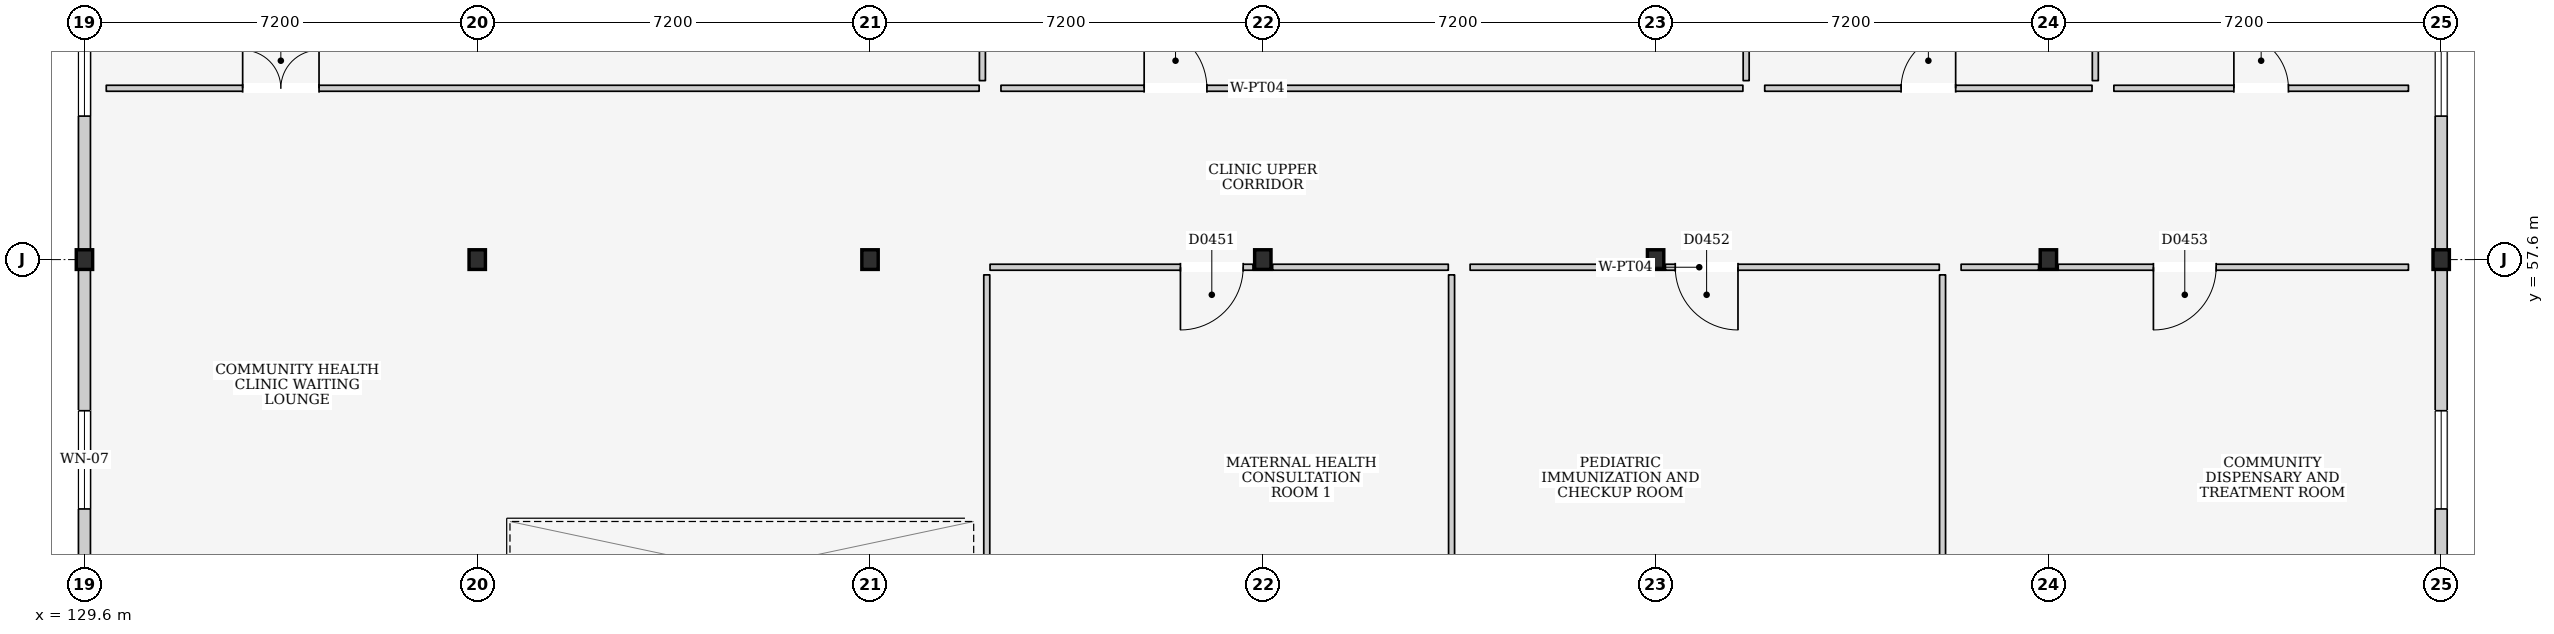
"""IFC4 building model, lengths in metres.
Left out: names, types, materials, properties, quantities, classifications, styles, units other than length and angle.
Written with IfcOpenShell. Run it as: python <this file> out.ifc"""

import sys

from ifc_helpers import new_model, si_unit, direction, frame, frame_2d, origin, origin_2d, place, context, subcontext, project, spatial, rectangle, i_section, extrude, element, fill, save


model = new_model("IFC4")
c1 = context("Model", 3, precision=1e-05, world=origin(), true_north=direction((0.0, 1.0)))
c2 = subcontext(c1, "Body", "Model", "MODEL_VIEW")
j1 = project(units=[si_unit("LENGTHUNIT", "METRE"), si_unit("PLANEANGLEUNIT", "RADIAN")], contexts=[c1])
p1 = place(None, origin())
s1 = spatial("IfcSite", under=j1, at=p1, CompositionType="ELEMENT")
p2 = place(p1, origin())
s2 = spatial("IfcBuilding", under=s1, at=p2, CompositionType="ELEMENT")
p3 = place(p2, frame((0.0, 0.0, 4.5)))
s3 = spatial("IfcBuildingStorey", under=s2, at=p3, CompositionType="ELEMENT", Elevation=4.5)
for number, where, z_axis, x_axis in (
    (1, (129.6, 57.6, 0.0), (0.0, 0.0, 1.0), (1.0, 0.0, 0.0)),
    (2, (136.8, 57.6, 0.0), (0.0, 0.0, 1.0), (1.0, 0.0, 0.0)),
    (3, (144.0, 57.6, 0.0), (0.0, 0.0, 1.0), (1.0, 0.0, 0.0)),
    (4, (151.2, 57.6, 0.0), (0.0, 0.0, 1.0), (1.0, 0.0, 0.0)),
    (5, (158.4, 57.6, 0.0), (0.0, 0.0, 1.0), (1.0, 0.0, 0.0)),
    (6, (165.6, 57.6, 0.0), (0.0, 0.0, 1.0), (1.0, 0.0, 0.0)),
    (7, (172.8, 57.6, 0.0), (0.0, 0.0, 1.0), (1.0, 0.0, 0.0)),
):
    element("IfcColumn", number, at=place(p3, frame(where, z_axis=z_axis, x_axis=x_axis)), inside=s3, PredefinedType="COLUMN", context=c2, shape_type="SweptSolid", body=[
        extrude(i_section(OverallWidth=0.3, OverallDepth=0.36, WebThickness=0.012, FlangeThickness=0.022, at=origin_2d()), origin(), (0.0, 0.0, 1.0), 4.5),
    ])
p4 = place(p3, frame((129.6, 50.58, 0.0), z_axis=(0.0, 0.0, 1.0), x_axis=(0.0, 1.0, 0.0)))
e8 = element("IfcWall", 8, at=p4, inside=s3, PredefinedType="ELEMENTEDWALL", context=c2, shape_type="SweptSolid", body=[
    extrude(rectangle(XDim=6.84, YDim=0.22, at=frame_2d((3.42, 0.0))), origin(), (0.0, 0.0, 1.0), 3.9),
])
p5 = place(p4, frame((2.45, 0.0, 0.9)))
e9 = element("IfcOpeningElement", 9, at=p5, cuts=e8, PredefinedType="OPENING", context=c2, shape_type="SweptSolid", body=[
    extrude(rectangle(XDim=1.8, YDim=1.8, at=frame_2d((0.9, 0.9))), frame((0.0, 0.125, 0.0), z_axis=(0.0, -1.0, 0.0), x_axis=(1.0, 0.0, 0.0)), (0.0, 0.0, 1.0), 0.25),
])
p6 = place(p3, frame((172.8, 50.58, 0.0), z_axis=(0.0, 0.0, 1.0), x_axis=(0.0, 1.0, 0.0)))
e10 = element("IfcWall", 10, at=p6, inside=s3, PredefinedType="ELEMENTEDWALL", context=c2, shape_type="SweptSolid", body=[
    extrude(rectangle(XDim=6.84, YDim=0.22, at=frame_2d((3.42, 0.0))), origin(), (0.0, 0.0, 1.0), 3.9),
])
p7 = place(p6, frame((2.45, 0.0, 0.9)))
e11 = element("IfcOpeningElement", 11, at=p7, cuts=e10, PredefinedType="OPENING", context=c2, shape_type="SweptSolid", body=[
    extrude(rectangle(XDim=1.8, YDim=1.8, at=frame_2d((0.9, 0.9))), frame((0.0, 0.125, 0.0), z_axis=(0.0, -1.0, 0.0), x_axis=(1.0, 0.0, 0.0)), (0.0, 0.0, 1.0), 0.25),
])
p8 = place(p3, frame((129.6, 57.78, 0.0), z_axis=(0.0, 0.0, 1.0), x_axis=(0.0, 1.0, 0.0)))
e12 = element("IfcWall", 12, at=p8, inside=s3, PredefinedType="ELEMENTEDWALL", context=c2, shape_type="SweptSolid", body=[
    extrude(rectangle(XDim=6.84, YDim=0.22, at=frame_2d((3.42, 0.0))), origin(), (0.0, 0.0, 1.0), 3.9),
])
p9 = place(p8, frame((2.45, 0.0, 0.9)))
e13 = element("IfcOpeningElement", 13, at=p9, cuts=e12, PredefinedType="OPENING", context=c2, shape_type="SweptSolid", body=[
    extrude(rectangle(XDim=1.8, YDim=1.8, at=frame_2d((0.9, 0.9))), frame((0.0, 0.125, 0.0), z_axis=(0.0, -1.0, 0.0), x_axis=(1.0, 0.0, 0.0)), (0.0, 0.0, 1.0), 0.25),
])
p10 = place(p3, frame((172.8, 57.78, 0.0), z_axis=(0.0, 0.0, 1.0), x_axis=(0.0, 1.0, 0.0)))
e14 = element("IfcWall", 14, at=p10, inside=s3, PredefinedType="ELEMENTEDWALL", context=c2, shape_type="SweptSolid", body=[
    extrude(rectangle(XDim=6.84, YDim=0.22, at=frame_2d((3.42, 0.0))), origin(), (0.0, 0.0, 1.0), 3.9),
])
p11 = place(p10, frame((2.45, 0.0, 0.9)))
e15 = element("IfcOpeningElement", 15, at=p11, cuts=e14, PredefinedType="OPENING", context=c2, shape_type="SweptSolid", body=[
    extrude(rectangle(XDim=1.8, YDim=1.8, at=frame_2d((0.9, 0.9))), frame((0.0, 0.125, 0.0), z_axis=(0.0, -1.0, 0.0), x_axis=(1.0, 0.0, 0.0)), (0.0, 0.0, 1.0), 0.25),
])
p12 = place(p3, frame((146.2, 57.46, 0.0), z_axis=(0.0, 0.0, 1.0), x_axis=(1.0, 0.0, 0.0)))
e16 = element("IfcWall", 16, at=p12, inside=s3, PredefinedType="PARTITIONING", context=c2, shape_type="SweptSolid", body=[
    extrude(rectangle(XDim=4.82, YDim=0.11, at=frame_2d((2.41, 0.0))), origin(), (0.0, 0.0, 1.0), 4.25),
])
p13 = place(p12, frame((3.49, 0.0, 0.0)))
e17 = element("IfcOpeningElement", 17, at=p13, cuts=e16, PredefinedType="OPENING", context=c2, shape_type="SweptSolid", body=[
    extrude(rectangle(XDim=1.15, YDim=2.25, at=frame_2d((0.575, 1.125))), frame((0.0, 0.07, 0.0), z_axis=(0.0, -1.0, 0.0), x_axis=(1.0, 0.0, 0.0)), (0.0, 0.0, 1.0), 0.14),
])
p14 = place(p3, frame((151.38, 57.46, 0.0), z_axis=(0.0, 0.0, 1.0), x_axis=(1.0, 0.0, 0.0)))
e18 = element("IfcWall", 18, at=p14, inside=s3, PredefinedType="PARTITIONING", context=c2, shape_type="SweptSolid", body=[
    extrude(rectangle(XDim=3.22, YDim=0.11, at=frame_2d((1.61, 0.0))), origin(), (0.0, 0.0, 1.0), 4.25),
])
for number, where, z_axis, x_axis in (
    (19, (146.14, 50.88, 0.0), (0.0, 0.0, 1.0), (0.0, 1.0, 0.0)),
    (20, (154.66, 50.88, 0.0), (0.0, 0.0, 1.0), (0.0, 1.0, 0.0)),
):
    element("IfcWall", number, at=place(p3, frame(where, z_axis=z_axis, x_axis=x_axis)), inside=s3, PredefinedType="PARTITIONING", context=c2, shape_type="SweptSolid", body=[
        extrude(rectangle(XDim=6.44, YDim=0.11, at=frame_2d((3.22, 0.0))), origin(), (0.0, 0.0, 1.0), 4.25),
    ])
p15 = place(p3, frame((155.0, 57.46, 0.0), z_axis=(0.0, 0.0, 1.0), x_axis=(1.0, 0.0, 0.0)))
e21 = element("IfcWall", 21, at=p15, inside=s3, PredefinedType="PARTITIONING", context=c2, shape_type="SweptSolid", body=[
    extrude(rectangle(XDim=3.22, YDim=0.11, at=frame_2d((1.61, 0.0))), origin(), (0.0, 0.0, 1.0), 4.25),
])
p16 = place(p3, frame((158.58, 57.46, 0.0), z_axis=(0.0, 0.0, 1.0), x_axis=(1.0, 0.0, 0.0)))
e22 = element("IfcWall", 22, at=p16, inside=s3, PredefinedType="PARTITIONING", context=c2, shape_type="SweptSolid", body=[
    extrude(rectangle(XDim=5.02, YDim=0.11, at=frame_2d((2.51, 0.0))), origin(), (0.0, 0.0, 1.0), 4.25),
])
p17 = place(p16, frame((0.18, 0.0, 0.0)))
e23 = element("IfcOpeningElement", 23, at=p17, cuts=e22, PredefinedType="OPENING", context=c2, shape_type="SweptSolid", body=[
    extrude(rectangle(XDim=1.15, YDim=2.25, at=frame_2d((0.575, 1.125))), frame((0.0, 0.07, 0.0), z_axis=(0.0, -1.0, 0.0), x_axis=(1.0, 0.0, 0.0)), (0.0, 0.0, 1.0), 0.14),
])
p18 = place(p3, frame((163.66, 50.88, 0.0), z_axis=(0.0, 0.0, 1.0), x_axis=(0.0, 1.0, 0.0)))
e24 = element("IfcWall", 24, at=p18, inside=s3, PredefinedType="PARTITIONING", context=c2, shape_type="SweptSolid", body=[
    extrude(rectangle(XDim=6.44, YDim=0.11, at=frame_2d((3.22, 0.0))), origin(), (0.0, 0.0, 1.0), 4.25),
])
p19 = place(p3, frame((164.0, 57.46, 0.0), z_axis=(0.0, 0.0, 1.0), x_axis=(1.0, 0.0, 0.0)))
e25 = element("IfcWall", 25, at=p19, inside=s3, PredefinedType="PARTITIONING", context=c2, shape_type="SweptSolid", body=[
    extrude(rectangle(XDim=1.42, YDim=0.11, at=frame_2d((0.71, 0.0))), origin(), (0.0, 0.0, 1.0), 4.25),
])
p20 = place(p3, frame((165.78, 57.46, 0.0), z_axis=(0.0, 0.0, 1.0), x_axis=(1.0, 0.0, 0.0)))
e26 = element("IfcWall", 26, at=p20, inside=s3, PredefinedType="PARTITIONING", context=c2, shape_type="SweptSolid", body=[
    extrude(rectangle(XDim=6.42, YDim=0.11, at=frame_2d((3.21, 0.0))), origin(), (0.0, 0.0, 1.0), 4.25),
])
p21 = place(p20, frame((1.745, 0.0, 0.0)))
e27 = element("IfcOpeningElement", 27, at=p21, cuts=e26, PredefinedType="OPENING", context=c2, shape_type="SweptSolid", body=[
    extrude(rectangle(XDim=1.15, YDim=2.25, at=frame_2d((0.575, 1.125))), frame((0.0, 0.07, 0.0), z_axis=(0.0, -1.0, 0.0), x_axis=(1.0, 0.0, 0.0)), (0.0, 0.0, 1.0), 0.14),
])
p22 = place(p3, frame((130.0, 60.74, 0.0), z_axis=(0.0, 0.0, 1.0), x_axis=(1.0, 0.0, 0.0)))
e28 = element("IfcWall", 28, at=p22, inside=s3, PredefinedType="PARTITIONING", context=c2, shape_type="SweptSolid", body=[
    extrude(rectangle(XDim=16.0, YDim=0.11, at=frame_2d((8.0, 0.0))), origin(), (0.0, 0.0, 1.0), 4.25),
])
p23 = place(p22, frame((2.5, 0.0, 0.0)))
e29 = element("IfcOpeningElement", 29, at=p23, cuts=e28, PredefinedType="OPENING", context=c2, shape_type="SweptSolid", body=[
    extrude(rectangle(XDim=1.4, YDim=2.25, at=frame_2d((0.7, 1.125))), frame((0.0, 0.07, 0.0), z_axis=(0.0, -1.0, 0.0), x_axis=(1.0, 0.0, 0.0)), (0.0, 0.0, 1.0), 0.14),
])
p24 = place(p3, frame((146.06, 60.88, 0.0), z_axis=(0.0, 0.0, 1.0), x_axis=(0.0, 1.0, 0.0)))
e30 = element("IfcWall", 30, at=p24, inside=s3, PredefinedType="PARTITIONING", context=c2, shape_type="SweptSolid", body=[
    extrude(rectangle(XDim=10.44, YDim=0.11, at=frame_2d((5.22, 0.0))), origin(), (0.0, 0.0, 1.0), 4.25),
])
p25 = place(p3, frame((146.4, 60.74, 0.0), z_axis=(0.0, 0.0, 1.0), x_axis=(1.0, 0.0, 0.0)))
e31 = element("IfcWall", 31, at=p25, inside=s3, PredefinedType="PARTITIONING", context=c2, shape_type="SweptSolid", body=[
    extrude(rectangle(XDim=13.6, YDim=0.11, at=frame_2d((6.8, 0.0))), origin(), (0.0, 0.0, 1.0), 4.25),
])
p26 = place(p25, frame((2.625, 0.0, 0.0)))
e32 = element("IfcOpeningElement", 32, at=p26, cuts=e31, PredefinedType="OPENING", context=c2, shape_type="SweptSolid", body=[
    extrude(rectangle(XDim=1.15, YDim=2.25, at=frame_2d((0.575, 1.125))), frame((0.0, 0.07, 0.0), z_axis=(0.0, -1.0, 0.0), x_axis=(1.0, 0.0, 0.0)), (0.0, 0.0, 1.0), 0.14),
])
p27 = place(p3, frame((160.06, 60.88, 0.0), z_axis=(0.0, 0.0, 1.0), x_axis=(0.0, 1.0, 0.0)))
e33 = element("IfcWall", 33, at=p27, inside=s3, PredefinedType="PARTITIONING", context=c2, shape_type="SweptSolid", body=[
    extrude(rectangle(XDim=10.44, YDim=0.11, at=frame_2d((5.22, 0.0))), origin(), (0.0, 0.0, 1.0), 4.25),
])
p28 = place(p3, frame((160.4, 60.74, 0.0), z_axis=(0.0, 0.0, 1.0), x_axis=(1.0, 0.0, 0.0)))
e34 = element("IfcWall", 34, at=p28, inside=s3, PredefinedType="PARTITIONING", context=c2, shape_type="SweptSolid", body=[
    extrude(rectangle(XDim=6.0, YDim=0.11, at=frame_2d((3.0, 0.0))), origin(), (0.0, 0.0, 1.0), 4.25),
])
p29 = place(p28, frame((2.5, 0.0, 0.0)))
e35 = element("IfcOpeningElement", 35, at=p29, cuts=e34, PredefinedType="OPENING", context=c2, shape_type="SweptSolid", body=[
    extrude(rectangle(XDim=1.0, YDim=2.1, at=frame_2d((0.5, 1.05))), frame((0.0, 0.07, 0.0), z_axis=(0.0, -1.0, 0.0), x_axis=(1.0, 0.0, 0.0)), (0.0, 0.0, 1.0), 0.14),
])
p30 = place(p3, frame((166.46, 60.88, 0.0), z_axis=(0.0, 0.0, 1.0), x_axis=(0.0, 1.0, 0.0)))
e36 = element("IfcWall", 36, at=p30, inside=s3, PredefinedType="PARTITIONING", context=c2, shape_type="SweptSolid", body=[
    extrude(rectangle(XDim=10.44, YDim=0.11, at=frame_2d((5.22, 0.0))), origin(), (0.0, 0.0, 1.0), 4.25),
])
p31 = place(p3, frame((166.8, 60.74, 0.0), z_axis=(0.0, 0.0, 1.0), x_axis=(1.0, 0.0, 0.0)))
e37 = element("IfcWall", 37, at=p31, inside=s3, PredefinedType="PARTITIONING", context=c2, shape_type="SweptSolid", body=[
    extrude(rectangle(XDim=5.4, YDim=0.11, at=frame_2d((2.7, 0.0))), origin(), (0.0, 0.0, 1.0), 4.25),
])
p32 = place(p31, frame((2.2, 0.0, 0.0)))
e38 = element("IfcOpeningElement", 38, at=p32, cuts=e37, PredefinedType="OPENING", context=c2, shape_type="SweptSolid", body=[
    extrude(rectangle(XDim=1.0, YDim=2.1, at=frame_2d((0.5, 1.05))), frame((0.0, 0.07, 0.0), z_axis=(0.0, -1.0, 0.0), x_axis=(1.0, 0.0, 0.0)), (0.0, 0.0, 1.0), 0.14),
])
p33 = place(p5, origin())
e39 = element("IfcWindow", 39, at=p33, inside=s3, PartitioningType="DOUBLE_PANEL_VERTICAL", PredefinedType="WINDOW", context=c2, shape_type="SweptSolid", body=[
    extrude(rectangle(XDim=1.8, YDim=1.8, at=frame_2d((0.9, 0.9))), frame((0.0, 0.03, 0.0), z_axis=(0.0, -1.0, 0.0), x_axis=(1.0, 0.0, 0.0)), (0.0, 0.0, 1.0), 0.06),
])
fill(e9, e39)
p34 = place(p7, origin())
e40 = element("IfcWindow", 40, at=p34, inside=s3, PartitioningType="DOUBLE_PANEL_VERTICAL", PredefinedType="WINDOW", context=c2, shape_type="SweptSolid", body=[
    extrude(rectangle(XDim=1.8, YDim=1.8, at=frame_2d((0.9, 0.9))), frame((0.0, 0.03, 0.0), z_axis=(0.0, -1.0, 0.0), x_axis=(1.0, 0.0, 0.0)), (0.0, 0.0, 1.0), 0.06),
])
fill(e11, e40)
p35 = place(p9, origin())
e41 = element("IfcWindow", 41, at=p35, inside=s3, PartitioningType="DOUBLE_PANEL_VERTICAL", PredefinedType="WINDOW", context=c2, shape_type="SweptSolid", body=[
    extrude(rectangle(XDim=1.8, YDim=1.8, at=frame_2d((0.9, 0.9))), frame((0.0, 0.03, 0.0), z_axis=(0.0, -1.0, 0.0), x_axis=(1.0, 0.0, 0.0)), (0.0, 0.0, 1.0), 0.06),
])
fill(e13, e41)
p36 = place(p11, origin())
e42 = element("IfcWindow", 42, at=p36, inside=s3, PartitioningType="DOUBLE_PANEL_VERTICAL", PredefinedType="WINDOW", context=c2, shape_type="SweptSolid", body=[
    extrude(rectangle(XDim=1.8, YDim=1.8, at=frame_2d((0.9, 0.9))), frame((0.0, 0.03, 0.0), z_axis=(0.0, -1.0, 0.0), x_axis=(1.0, 0.0, 0.0)), (0.0, 0.0, 1.0), 0.06),
])
fill(e15, e42)
p37 = place(p13, frame((1.15, 0.0, 0.0), z_axis=(0.0, 0.0, 1.0), x_axis=(-1.0, 0.0, 0.0)))
e43 = element("IfcDoor", 43, at=p37, inside=s3, OperationType="SINGLE_SWING_RIGHT", PredefinedType="DOOR", context=c2, shape_type="SweptSolid", body=[
    extrude(rectangle(XDim=1.15, YDim=2.25, at=frame_2d((0.575, 1.125))), frame((0.0, 0.025, 0.0), z_axis=(0.0, -1.0, 0.0), x_axis=(1.0, 0.0, 0.0)), (0.0, 0.0, 1.0), 0.05),
])
fill(e17, e43)
p38 = place(p17, frame((1.15, 0.0, 0.0), z_axis=(0.0, 0.0, 1.0), x_axis=(-1.0, 0.0, 0.0)))
e44 = element("IfcDoor", 44, at=p38, inside=s3, OperationType="SINGLE_SWING_LEFT", PredefinedType="DOOR", context=c2, shape_type="SweptSolid", body=[
    extrude(rectangle(XDim=1.15, YDim=2.25, at=frame_2d((0.575, 1.125))), frame((0.0, 0.025, 0.0), z_axis=(0.0, -1.0, 0.0), x_axis=(1.0, 0.0, 0.0)), (0.0, 0.0, 1.0), 0.05),
])
fill(e23, e44)
p39 = place(p21, frame((1.15, 0.0, 0.0), z_axis=(0.0, 0.0, 1.0), x_axis=(-1.0, 0.0, 0.0)))
e45 = element("IfcDoor", 45, at=p39, inside=s3, OperationType="SINGLE_SWING_RIGHT", PredefinedType="DOOR", context=c2, shape_type="SweptSolid", body=[
    extrude(rectangle(XDim=1.15, YDim=2.25, at=frame_2d((0.575, 1.125))), frame((0.0, 0.025, 0.0), z_axis=(0.0, -1.0, 0.0), x_axis=(1.0, 0.0, 0.0)), (0.0, 0.0, 1.0), 0.05),
])
fill(e27, e45)
p40 = place(p23, origin())
e46 = element("IfcDoor", 46, at=p40, inside=s3, OperationType="DOUBLE_DOOR_SINGLE_SWING", PredefinedType="DOOR", context=c2, shape_type="SweptSolid", body=[
    extrude(rectangle(XDim=1.4, YDim=2.25, at=frame_2d((0.7, 1.125))), frame((0.0, 0.025, 0.0), z_axis=(0.0, -1.0, 0.0), x_axis=(1.0, 0.0, 0.0)), (0.0, 0.0, 1.0), 0.05),
])
fill(e29, e46)
p41 = place(p26, origin())
e47 = element("IfcDoor", 47, at=p41, inside=s3, OperationType="SINGLE_SWING_LEFT", PredefinedType="DOOR", context=c2, shape_type="SweptSolid", body=[
    extrude(rectangle(XDim=1.15, YDim=2.25, at=frame_2d((0.575, 1.125))), frame((0.0, 0.025, 0.0), z_axis=(0.0, -1.0, 0.0), x_axis=(1.0, 0.0, 0.0)), (0.0, 0.0, 1.0), 0.05),
])
fill(e32, e47)
p42 = place(p29, origin())
e48 = element("IfcDoor", 48, at=p42, inside=s3, OperationType="SINGLE_SWING_RIGHT", PredefinedType="DOOR", context=c2, shape_type="SweptSolid", body=[
    extrude(rectangle(XDim=1.0, YDim=2.1, at=frame_2d((0.5, 1.05))), frame((0.0, 0.025, 0.0), z_axis=(0.0, -1.0, 0.0), x_axis=(1.0, 0.0, 0.0)), (0.0, 0.0, 1.0), 0.05),
])
fill(e35, e48)
p43 = place(p32, origin())
e49 = element("IfcDoor", 49, at=p43, inside=s3, OperationType="SINGLE_SWING_LEFT", PredefinedType="DOOR", context=c2, shape_type="SweptSolid", body=[
    extrude(rectangle(XDim=1.0, YDim=2.1, at=frame_2d((0.5, 1.05))), frame((0.0, 0.025, 0.0), z_axis=(0.0, -1.0, 0.0), x_axis=(1.0, 0.0, 0.0)), (0.0, 0.0, 1.0), 0.05),
])
fill(e38, e49)
save(model, sys.argv[1])
